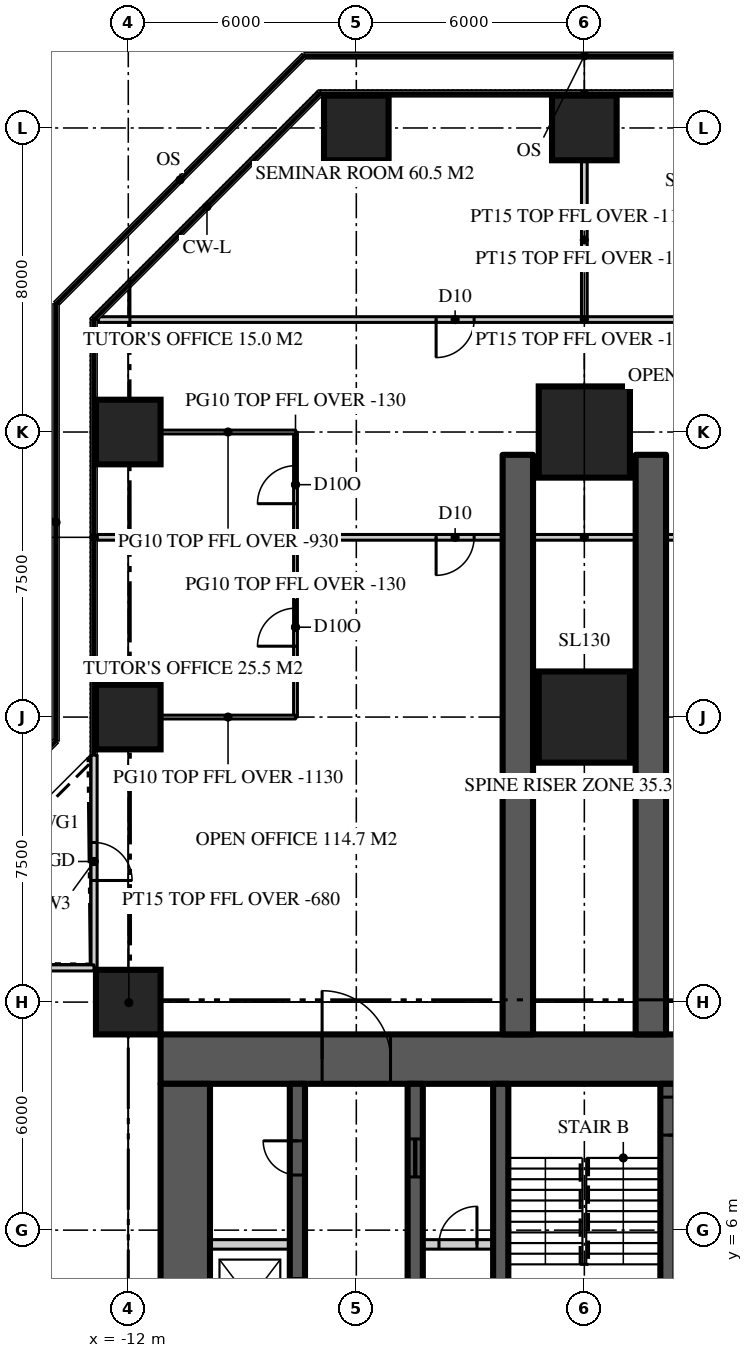
"""IFC4 building model, lengths in metres.
Left out: names, types, materials, properties, quantities, classifications, styles, units other than length and angle.
Written with IfcOpenShell. Run it as: python <this file> out.ifc"""

import sys

from ifc_helpers import new_model, si_unit, direction, frame, frame_2d, origin, origin_2d, place, context, subcontext, project, spatial, rectangle, extrude, element, fill, save


model = new_model("IFC4")
c1 = context("Model", 3, precision=1e-05, world=origin(), true_north=direction((0.0, 1.0)))
c2 = subcontext(c1, "Body", "Model", "MODEL_VIEW")
j1 = project(units=[si_unit("LENGTHUNIT", "METRE"), si_unit("PLANEANGLEUNIT", "RADIAN")], contexts=[c1])
p1 = place(None, origin())
s1 = spatial("IfcSite", under=j1, at=p1, CompositionType="ELEMENT")
p2 = place(p1, origin())
s2 = spatial("IfcBuilding", under=s1, at=p2, CompositionType="ELEMENT")
p3 = place(p2, frame((0.0, 0.0, 102.0)))
s3 = spatial("IfcBuildingStorey", under=s2, at=p3, CompositionType="ELEMENT", Elevation=102.0)
p4 = place(p3, frame((-11.15, 10.5, 0.0), z_axis=(0.0, 0.0, 1.0), x_axis=(1.0, 0.0, 0.0)))
e1 = element("IfcWall", 1, at=p4, inside=s3, PredefinedType="SHEAR", context=c2, shape_type="SweptSolid", body=[
    extrude(rectangle(XDim=22.3, YDim=1.3, at=frame_2d((11.15, 0.0))), origin(), (0.0, 0.0, 1.0), 3.9),
])
p5 = place(p4, frame((4.25, 0.0, 0.0)))
e2 = element("IfcOpeningElement", 2, at=p5, cuts=e1, PredefinedType="OPENING", context=c2, shape_type="SweptSolid", body=[
    extrude(rectangle(XDim=1.8, YDim=2.2, at=frame_2d((0.9, 1.1))), frame((0.0, 0.66, 0.0), z_axis=(0.0, -1.0, 0.0), x_axis=(1.0, 0.0, 0.0)), (0.0, 0.0, 1.0), 1.32),
])
p6 = place(p4, frame((16.25, 0.0, 0.0)))
e3 = element("IfcOpeningElement", 3, at=p6, cuts=e1, PredefinedType="OPENING", context=c2, shape_type="SweptSolid", body=[
    extrude(rectangle(XDim=1.8, YDim=2.2, at=frame_2d((0.9, 1.1))), frame((0.0, 0.66, 0.0), z_axis=(0.0, -1.0, 0.0), x_axis=(1.0, 0.0, 0.0)), (0.0, 0.0, 1.0), 1.32),
])
p7 = place(p3, frame((-10.5, 9.85, 0.0), z_axis=(0.0, 0.0, 1.0), x_axis=(0.0, -1.0, 0.0)))
e4 = element("IfcWall", 4, at=p7, inside=s3, PredefinedType="SHEAR", context=c2, shape_type="SweptSolid", body=[
    extrude(rectangle(XDim=19.7, YDim=1.3, at=frame_2d((9.85, 0.0))), origin(), (0.0, 0.0, 1.0), 3.9),
])
p8 = place(p7, frame((17.25, 0.0, 0.0)))
e5 = element("IfcOpeningElement", 5, at=p8, cuts=e4, PredefinedType="OPENING", context=c2, shape_type="SweptSolid", body=[
    extrude(rectangle(XDim=1.0, YDim=2.2, at=frame_2d((0.5, 1.1))), frame((0.0, 0.66, 0.0), z_axis=(0.0, -1.0, 0.0), x_axis=(1.0, 0.0, 0.0)), (0.0, 0.0, 1.0), 1.32),
])
for number, where, z_axis, x_axis in (
    (6, (1.75, 11.15, 0.0), (0.0, 0.0, 1.0), (0.0, 1.0, 0.0)),
    (7, (-1.75, 11.15, 0.0), (0.0, 0.0, 1.0), (0.0, 1.0, 0.0)),
):
    element("IfcWall", number, at=place(p3, frame(where, z_axis=z_axis, x_axis=x_axis)), inside=s3, PredefinedType="SHEAR", context=c2, shape_type="SweptSolid", body=[
        extrude(rectangle(XDim=15.25, YDim=0.8, at=frame_2d((7.625, 0.0))), origin(), (0.0, 0.0, 1.0), 3.9),
    ])
for number, where, z_axis, x_axis in (
    (8, (-12.0, 12.0, 0.0), (0.0, 0.0, 1.0), (1.0, 0.0, 0.0)),
    (9, (-12.0, 19.5, 0.0), (0.0, 0.0, 1.0), (1.0, 0.0, 0.0)),
):
    element("IfcColumn", number, at=place(p3, frame(where, z_axis=z_axis, x_axis=x_axis)), inside=s3, PredefinedType="COLUMN", context=c2, shape_type="SweptSolid", body=[
        extrude(rectangle(XDim=1.7, YDim=1.7, at=origin_2d()), origin(), (0.0, 0.0, 1.0), 3.9),
    ])
p9 = place(p3, frame((0.0, 19.5, 0.0), z_axis=(0.0, 0.0, 1.0), x_axis=(1.0, 0.0, 0.0)))
e10 = element("IfcColumn", 10, at=p9, inside=s3, PredefinedType="COLUMN", context=c2, shape_type="SweptSolid", body=[
    extrude(rectangle(XDim=2.4, YDim=2.4, at=origin_2d()), origin(), (0.0, 0.0, 1.0), 3.9),
])
p10 = place(p3, frame((-12.0, 27.0, 0.0), z_axis=(0.0, 0.0, 1.0), x_axis=(1.0, 0.0, 0.0)))
e11 = element("IfcColumn", 11, at=p10, inside=s3, PredefinedType="COLUMN", context=c2, shape_type="SweptSolid", body=[
    extrude(rectangle(XDim=1.7, YDim=1.7, at=origin_2d()), origin(), (0.0, 0.0, 1.0), 3.9),
])
p11 = place(p3, frame((0.0, 27.0, 0.0), z_axis=(0.0, 0.0, 1.0), x_axis=(1.0, 0.0, 0.0)))
e12 = element("IfcColumn", 12, at=p11, inside=s3, PredefinedType="COLUMN", context=c2, shape_type="SweptSolid", body=[
    extrude(rectangle(XDim=2.4, YDim=2.4, at=origin_2d()), origin(), (0.0, 0.0, 1.0), 3.9),
])
for number, where, z_axis, x_axis in (
    (13, (-6.0, 35.0, 0.0), (0.0, 0.0, 1.0), (1.0, 0.0, 0.0)),
    (14, (0.0, 35.0, 0.0), (0.0, 0.0, 1.0), (1.0, 0.0, 0.0)),
):
    element("IfcColumn", number, at=place(p3, frame(where, z_axis=z_axis, x_axis=x_axis)), inside=s3, PredefinedType="COLUMN", context=c2, shape_type="SweptSolid", body=[
        extrude(rectangle(XDim=1.7, YDim=1.7, at=origin_2d()), origin(), (0.0, 0.0, 1.0), 3.9),
    ])
p12 = place(p3, frame((-12.9, 18.5, 0.0), z_axis=(0.0, 0.0, 1.0), x_axis=(0.0, -1.0, 0.0)))
e15 = element("IfcWall", 15, at=p12, inside=s3, PredefinedType="SOLIDWALL", context=c2, shape_type="SweptSolid", body=[
    extrude(rectangle(XDim=5.6, YDim=0.16, at=frame_2d((2.8, 0.0))), origin(), (0.0, 0.0, 1.0), 3.77),
])
p13 = place(p12, frame((2.3, 0.0, 0.0)))
e16 = element("IfcOpeningElement", 16, at=p13, cuts=e15, PredefinedType="OPENING", context=c2, shape_type="SweptSolid", body=[
    extrude(rectangle(XDim=1.0, YDim=2.2, at=frame_2d((0.5, 1.1))), frame((0.0, 0.09, 0.0), z_axis=(0.0, -1.0, 0.0), x_axis=(1.0, 0.0, 0.0)), (0.0, 0.0, 1.0), 0.18),
])
p14 = place(p3, frame((-12.9, 12.9, 0.0), z_axis=(0.0, 0.0, 1.0), x_axis=(-1.0, 0.0, 0.0)))
e17 = element("IfcWall", 17, at=p14, inside=s3, PredefinedType="SOLIDWALL", context=c2, shape_type="SweptSolid", body=[
    extrude(rectangle(XDim=5.6, YDim=0.16, at=frame_2d((2.8, 0.0))), origin(), (0.0, 0.0, 1.0), 3.77),
])
p15 = place(p3, frame((-7.55, -9.85, 0.0), z_axis=(0.0, 0.0, 1.0), x_axis=(0.0, 1.0, 0.0)))
e18 = element("IfcWall", 18, at=p15, inside=s3, PredefinedType="SHEAR", context=c2, shape_type="SweptSolid", body=[
    extrude(rectangle(XDim=19.7, YDim=0.4, at=frame_2d((9.85, 0.0))), origin(), (0.0, 0.0, 1.0), 3.9),
])
p16 = place(p15, frame((1.45, 0.0, 0.0)))
e19 = element("IfcOpeningElement", 19, at=p16, cuts=e18, PredefinedType="OPENING", context=c2, shape_type="SweptSolid", body=[
    extrude(rectangle(XDim=1.0, YDim=2.2, at=frame_2d((0.5, 1.1))), frame((0.0, 0.21, 0.0), z_axis=(0.0, -1.0, 0.0), x_axis=(1.0, 0.0, 0.0)), (0.0, 0.0, 1.0), 0.42),
])
p17 = place(p15, frame((17.3, 0.0, 0.0)))
e20 = element("IfcOpeningElement", 20, at=p17, cuts=e18, PredefinedType="OPENING", context=c2, shape_type="SweptSolid", body=[
    extrude(rectangle(XDim=0.9, YDim=2.1, at=frame_2d((0.45, 1.05))), frame((0.0, 0.21, 0.0), z_axis=(0.0, -1.0, 0.0), x_axis=(1.0, 0.0, 0.0)), (0.0, 0.0, 1.0), 0.42),
])
p18 = place(p15, frame((5.125, 0.0, 0.0)))
e21 = element("IfcOpeningElement", 21, at=p18, cuts=e18, PredefinedType="OPENING", context=c2, shape_type="SweptSolid", body=[
    extrude(rectangle(XDim=1.1, YDim=2.2, at=frame_2d((0.55, 1.1))), frame((0.0, 0.21, 0.0), z_axis=(0.0, -1.0, 0.0), x_axis=(1.0, 0.0, 0.0)), (0.0, 0.0, 1.0), 0.42),
])
p19 = place(p15, frame((7.925, 0.0, 0.0)))
e22 = element("IfcOpeningElement", 22, at=p19, cuts=e18, PredefinedType="OPENING", context=c2, shape_type="SweptSolid", body=[
    extrude(rectangle(XDim=1.1, YDim=2.2, at=frame_2d((0.55, 1.1))), frame((0.0, 0.21, 0.0), z_axis=(0.0, -1.0, 0.0), x_axis=(1.0, 0.0, 0.0)), (0.0, 0.0, 1.0), 0.42),
])
p20 = place(p15, frame((10.675, 0.0, 0.0)))
e23 = element("IfcOpeningElement", 23, at=p20, cuts=e18, PredefinedType="OPENING", context=c2, shape_type="SweptSolid", body=[
    extrude(rectangle(XDim=1.1, YDim=2.2, at=frame_2d((0.55, 1.1))), frame((0.0, 0.21, 0.0), z_axis=(0.0, -1.0, 0.0), x_axis=(1.0, 0.0, 0.0)), (0.0, 0.0, 1.0), 0.42),
])
p21 = place(p15, frame((13.475, 0.0, 0.0)))
e24 = element("IfcOpeningElement", 24, at=p21, cuts=e18, PredefinedType="OPENING", context=c2, shape_type="SweptSolid", body=[
    extrude(rectangle(XDim=1.1, YDim=2.2, at=frame_2d((0.55, 1.1))), frame((0.0, 0.21, 0.0), z_axis=(0.0, -1.0, 0.0), x_axis=(1.0, 0.0, 0.0)), (0.0, 0.0, 1.0), 0.42),
])
p22 = place(p3, frame((-4.45, -9.85, 0.0), z_axis=(0.0, 0.0, 1.0), x_axis=(0.0, 1.0, 0.0)))
e25 = element("IfcWall", 25, at=p22, inside=s3, PredefinedType="SHEAR", context=c2, shape_type="SweptSolid", body=[
    extrude(rectangle(XDim=19.7, YDim=0.4, at=frame_2d((9.85, 0.0))), origin(), (0.0, 0.0, 1.0), 3.9),
])
p23 = place(p22, frame((1.95, 0.0, 0.0)))
e26 = element("IfcOpeningElement", 26, at=p23, cuts=e25, PredefinedType="OPENING", context=c2, shape_type="SweptSolid", body=[
    extrude(rectangle(XDim=1.0, YDim=2.2, at=frame_2d((0.5, 1.1))), frame((0.0, 0.21, 0.0), z_axis=(0.0, -1.0, 0.0), x_axis=(1.0, 0.0, 0.0)), (0.0, 0.0, 1.0), 0.42),
])
p24 = place(p22, frame((17.25, 0.0, 0.0)))
e27 = element("IfcOpeningElement", 27, at=p24, cuts=e25, PredefinedType="OPENING", context=c2, shape_type="SweptSolid", body=[
    extrude(rectangle(XDim=1.0, YDim=2.1, at=frame_2d((0.5, 1.05))), frame((0.0, 0.21, 0.0), z_axis=(0.0, -1.0, 0.0), x_axis=(1.0, 0.0, 0.0)), (0.0, 0.0, 1.0), 0.42),
])
p25 = place(p3, frame((-2.2, -9.85, 0.0), z_axis=(0.0, 0.0, 1.0), x_axis=(0.0, 1.0, 0.0)))
e28 = element("IfcWall", 28, at=p25, inside=s3, PredefinedType="SHEAR", context=c2, shape_type="SweptSolid", body=[
    extrude(rectangle(XDim=19.7, YDim=0.4, at=frame_2d((9.85, 0.0))), origin(), (0.0, 0.0, 1.0), 3.9),
])
p26 = place(p25, frame((0.35, 0.0, 0.0)))
e29 = element("IfcOpeningElement", 29, at=p26, cuts=e28, PredefinedType="OPENING", context=c2, shape_type="SweptSolid", body=[
    extrude(rectangle(XDim=1.0, YDim=2.2, at=frame_2d((0.5, 1.1))), frame((0.0, 0.21, 0.0), z_axis=(0.0, -1.0, 0.0), x_axis=(1.0, 0.0, 0.0)), (0.0, 0.0, 1.0), 0.42),
])
p27 = place(p3, frame((2.2, 9.85, 0.0), z_axis=(0.0, 0.0, 1.0), x_axis=(0.0, -1.0, 0.0)))
e30 = element("IfcWall", 30, at=p27, inside=s3, PredefinedType="SHEAR", context=c2, shape_type="SweptSolid", body=[
    extrude(rectangle(XDim=19.7, YDim=0.4, at=frame_2d((9.85, 0.0))), origin(), (0.0, 0.0, 1.0), 3.9),
])
p28 = place(p27, frame((0.35, 0.0, 0.0)))
e31 = element("IfcOpeningElement", 31, at=p28, cuts=e30, PredefinedType="OPENING", context=c2, shape_type="SweptSolid", body=[
    extrude(rectangle(XDim=1.0, YDim=2.2, at=frame_2d((0.5, 1.1))), frame((0.0, 0.21, 0.0), z_axis=(0.0, -1.0, 0.0), x_axis=(1.0, 0.0, 0.0)), (0.0, 0.0, 1.0), 0.42),
])
p29 = place(p3, frame((-9.85, 5.625, 0.0), z_axis=(0.0, 0.0, 1.0), x_axis=(1.0, 0.0, 0.0)))
e32 = element("IfcWall", 32, at=p29, inside=s3, PredefinedType="SOLIDWALL", context=c2, shape_type="SweptSolid", body=[
    extrude(rectangle(XDim=2.1, YDim=0.25, at=frame_2d((1.05, 0.0))), origin(), (0.0, 0.0, 1.0), 3.7),
])
p30 = place(p3, frame((-4.25, 5.625, 0.0), z_axis=(0.0, 0.0, 1.0), x_axis=(1.0, 0.0, 0.0)))
e33 = element("IfcWall", 33, at=p30, inside=s3, PredefinedType="SOLIDWALL", context=c2, shape_type="SweptSolid", body=[
    extrude(rectangle(XDim=1.85, YDim=0.25, at=frame_2d((0.925, 0.0))), origin(), (0.0, 0.0, 1.0), 3.7),
])
p31 = place(p30, frame((0.425, 0.0, 0.0)))
e34 = element("IfcOpeningElement", 34, at=p31, cuts=e33, PredefinedType="OPENING", context=c2, shape_type="SweptSolid", body=[
    extrude(rectangle(XDim=1.0, YDim=2.2, at=frame_2d((0.5, 1.1))), frame((0.0, 0.135, 0.0), z_axis=(0.0, -1.0, 0.0), x_axis=(1.0, 0.0, 0.0)), (0.0, 0.0, 1.0), 0.27),
])
p32 = place(p3, frame((12.82, 24.229, 0.0), z_axis=(0.0, 0.0, 1.0), x_axis=(-1.0, 0.0, 0.0)))
e35 = element("IfcWall", 35, at=p32, inside=s3, PredefinedType="PARTITIONING", context=c2, shape_type="SweptSolid", body=[
    extrude(rectangle(XDim=25.64, YDim=0.15, at=frame_2d((12.82, 0.0))), origin(), (0.0, 0.0, 1.0), 3.77),
])
p33 = place(p32, frame((15.72, 0.0, 0.0)))
e36 = element("IfcOpeningElement", 36, at=p33, cuts=e35, PredefinedType="OPENING", context=c2, shape_type="SweptSolid", body=[
    extrude(rectangle(XDim=1.0, YDim=2.2, at=frame_2d((0.5, 1.1))), frame((0.0, 0.085, 0.0), z_axis=(0.0, -1.0, 0.0), x_axis=(1.0, 0.0, 0.0)), (0.0, 0.0, 1.0), 0.17),
])
p34 = place(p32, frame((8.92, 0.0, 0.0)))
e37 = element("IfcOpeningElement", 37, at=p34, cuts=e35, PredefinedType="OPENING", context=c2, shape_type="SweptSolid", body=[
    extrude(rectangle(XDim=1.0, YDim=2.2, at=frame_2d((0.5, 1.1))), frame((0.0, 0.085, 0.0), z_axis=(0.0, -1.0, 0.0), x_axis=(1.0, 0.0, 0.0)), (0.0, 0.0, 1.0), 0.17),
])
p35 = place(p3, frame((12.786, 29.959, 0.0), z_axis=(0.0, 0.0, 1.0), x_axis=(-1.0, 0.0, 0.0)))
e38 = element("IfcWall", 38, at=p35, inside=s3, PredefinedType="PARTITIONING", context=c2, shape_type="SweptSolid", body=[
    extrude(rectangle(XDim=25.573, YDim=0.15, at=frame_2d((12.786, 0.0))), origin(), (0.0, 0.0, 1.0), 3.77),
])
p36 = place(p35, frame((15.687, 0.0, 0.0)))
e39 = element("IfcOpeningElement", 39, at=p36, cuts=e38, PredefinedType="OPENING", context=c2, shape_type="SweptSolid", body=[
    extrude(rectangle(XDim=1.0, YDim=2.2, at=frame_2d((0.5, 1.1))), frame((0.0, 0.085, 0.0), z_axis=(0.0, -1.0, 0.0), x_axis=(1.0, 0.0, 0.0)), (0.0, 0.0, 1.0), 0.17),
])
p37 = place(p35, frame((8.886, 0.0, 0.0)))
e40 = element("IfcOpeningElement", 40, at=p37, cuts=e38, PredefinedType="OPENING", context=c2, shape_type="SweptSolid", body=[
    extrude(rectangle(XDim=1.0, YDim=2.2, at=frame_2d((0.5, 1.1))), frame((0.0, 0.085, 0.0), z_axis=(0.0, -1.0, 0.0), x_axis=(1.0, 0.0, 0.0)), (0.0, 0.0, 1.0), 0.17),
])
p38 = place(p3, frame((0.0, 29.959, 0.0), z_axis=(0.0, 0.0, 1.0), x_axis=(0.0, 1.0, 0.0)))
e41 = element("IfcWall", 41, at=p38, inside=s3, PredefinedType="PARTITIONING", context=c2, shape_type="SweptSolid", body=[
    extrude(rectangle(XDim=4.191, YDim=0.15, at=frame_2d((2.095, 0.0))), origin(), (0.0, 0.0, 1.0), 2.77),
])
p39 = place(p3, frame((-7.6, 19.5, 0.0), z_axis=(0.0, 0.0, 1.0), x_axis=(0.0, 1.0, 0.0)))
e42 = element("IfcWall", 42, at=p39, inside=s3, PredefinedType="PARTITIONING", context=c2, shape_type="SweptSolid", body=[
    extrude(rectangle(XDim=4.729, YDim=0.1, at=frame_2d((2.365, 0.0))), origin(), (0.0, 0.0, 1.0), 3.77),
])
p40 = place(p39, frame((1.865, 0.0, 0.0)))
e43 = element("IfcOpeningElement", 43, at=p40, cuts=e42, PredefinedType="OPENING", context=c2, shape_type="SweptSolid", body=[
    extrude(rectangle(XDim=1.0, YDim=2.2, at=frame_2d((0.5, 1.1))), frame((0.0, 0.06, 0.0), z_axis=(0.0, -1.0, 0.0), x_axis=(1.0, 0.0, 0.0)), (0.0, 0.0, 1.0), 0.12),
])
p41 = place(p3, frame((-7.6, 24.229, 0.0), z_axis=(0.0, 0.0, 1.0), x_axis=(0.0, 1.0, 0.0)))
e44 = element("IfcWall", 44, at=p41, inside=s3, PredefinedType="PARTITIONING", context=c2, shape_type="SweptSolid", body=[
    extrude(rectangle(XDim=2.771, YDim=0.1, at=frame_2d((1.385, 0.0))), origin(), (0.0, 0.0, 1.0), 3.77),
])
p42 = place(p41, frame((0.885, 0.0, 0.0)))
e45 = element("IfcOpeningElement", 45, at=p42, cuts=e44, PredefinedType="OPENING", context=c2, shape_type="SweptSolid", body=[
    extrude(rectangle(XDim=1.0, YDim=2.2, at=frame_2d((0.5, 1.1))), frame((0.0, 0.06, 0.0), z_axis=(0.0, -1.0, 0.0), x_axis=(1.0, 0.0, 0.0)), (0.0, 0.0, 1.0), 0.12),
])
p43 = place(p3, frame((-7.6, 19.5, 0.0), z_axis=(0.0, 0.0, 1.0), x_axis=(-1.0, 0.0, 0.0)))
e46 = element("IfcWall", 46, at=p43, inside=s3, PredefinedType="PARTITIONING", context=c2, shape_type="SweptSolid", body=[
    extrude(rectangle(XDim=3.55, YDim=0.1, at=frame_2d((1.775, 0.0))), origin(), (0.0, 0.0, 1.0), 2.77),
])
p44 = place(p3, frame((-7.6, 27.0, 0.0), z_axis=(0.0, 0.0, 1.0), x_axis=(-1.0, 0.0, 0.0)))
e47 = element("IfcWall", 47, at=p44, inside=s3, PredefinedType="PARTITIONING", context=c2, shape_type="SweptSolid", body=[
    extrude(rectangle(XDim=3.55, YDim=0.1, at=frame_2d((1.775, 0.0))), origin(), (0.0, 0.0, 1.0), 2.97),
])
p45 = place(p3, frame((-11.15, 11.15, 0.0), z_axis=(0.0, 0.0, 1.0), x_axis=(-0.707106781187, 0.707106781187, 0.0)))
e48 = element("IfcWall", 48, at=p45, inside=s3, PredefinedType="PARTITIONING", context=c2, shape_type="SweptSolid", body=[
    extrude(rectangle(XDim=2.362, YDim=0.15, at=frame_2d((1.181, 0.0))), origin(), (0.0, 0.0, 1.0), 3.22),
])
p46 = place(p13, origin())
e49 = element("IfcDoor", 49, at=p46, inside=s3, OperationType="SINGLE_SWING_RIGHT", PredefinedType="DOOR", context=c2, shape_type="SweptSolid", body=[
    extrude(rectangle(XDim=1.0, YDim=2.2, at=frame_2d((0.5, 1.1))), frame((0.0, 0.025, 0.0), z_axis=(0.0, -1.0, 0.0), x_axis=(1.0, 0.0, 0.0)), (0.0, 0.0, 1.0), 0.05),
])
fill(e16, e49)
p47 = place(p5, origin())
e50 = element("IfcDoor", 50, at=p47, inside=s3, OperationType="DOUBLE_DOOR_DOUBLE_SWING", PredefinedType="DOOR", context=c2, shape_type="SweptSolid", body=[
    extrude(rectangle(XDim=1.8, YDim=2.2, at=frame_2d((0.9, 1.1))), frame((0.0, 0.025, 0.0), z_axis=(0.0, -1.0, 0.0), x_axis=(1.0, 0.0, 0.0)), (0.0, 0.0, 1.0), 0.05),
])
fill(e2, e50)
p48 = place(p28, origin())
e51 = element("IfcDoor", 51, at=p48, inside=s3, OperationType="SINGLE_SWING_RIGHT", PredefinedType="DOOR", context=c2, shape_type="SweptSolid", body=[
    extrude(rectangle(XDim=1.0, YDim=2.2, at=frame_2d((0.5, 1.1))), frame((0.0, 0.025, 0.0), z_axis=(0.0, -1.0, 0.0), x_axis=(1.0, 0.0, 0.0)), (0.0, 0.0, 1.0), 0.05),
])
fill(e31, e51)
p49 = place(p17, origin())
e52 = element("IfcDoor", 52, at=p49, inside=s3, OperationType="SINGLE_SWING_RIGHT", PredefinedType="DOOR", context=c2, shape_type="SweptSolid", body=[
    extrude(rectangle(XDim=0.9, YDim=2.1, at=frame_2d((0.45, 1.05))), frame((0.0, 0.025, 0.0), z_axis=(0.0, -1.0, 0.0), x_axis=(1.0, 0.0, 0.0)), (0.0, 0.0, 1.0), 0.05),
])
fill(e20, e52)
p50 = place(p24, origin())
e53 = element("IfcDoor", 53, at=p50, inside=s3, OperationType="SLIDING_TO_LEFT", PredefinedType="DOOR", context=c2, shape_type="SweptSolid", body=[
    extrude(rectangle(XDim=1.0, YDim=2.1, at=frame_2d((0.5, 1.05))), frame((0.0, 0.025, 0.0), z_axis=(0.0, -1.0, 0.0), x_axis=(1.0, 0.0, 0.0)), (0.0, 0.0, 1.0), 0.05),
])
fill(e27, e53)
p51 = place(p33, origin())
e54 = element("IfcDoor", 54, at=p51, inside=s3, OperationType="SINGLE_SWING_RIGHT", PredefinedType="DOOR", context=c2, shape_type="SweptSolid", body=[
    extrude(rectangle(XDim=1.0, YDim=2.2, at=frame_2d((0.5, 1.1))), frame((0.0, 0.025, 0.0), z_axis=(0.0, -1.0, 0.0), x_axis=(1.0, 0.0, 0.0)), (0.0, 0.0, 1.0), 0.05),
])
fill(e36, e54)
p52 = place(p36, origin())
e55 = element("IfcDoor", 55, at=p52, inside=s3, OperationType="SINGLE_SWING_RIGHT", PredefinedType="DOOR", context=c2, shape_type="SweptSolid", body=[
    extrude(rectangle(XDim=1.0, YDim=2.2, at=frame_2d((0.5, 1.1))), frame((0.0, 0.025, 0.0), z_axis=(0.0, -1.0, 0.0), x_axis=(1.0, 0.0, 0.0)), (0.0, 0.0, 1.0), 0.05),
])
fill(e39, e55)
p53 = place(p40, origin())
e56 = element("IfcDoor", 56, at=p53, inside=s3, OperationType="SINGLE_SWING_LEFT", PredefinedType="DOOR", context=c2, shape_type="SweptSolid", body=[
    extrude(rectangle(XDim=1.0, YDim=2.2, at=frame_2d((0.5, 1.1))), frame((0.0, 0.025, 0.0), z_axis=(0.0, -1.0, 0.0), x_axis=(1.0, 0.0, 0.0)), (0.0, 0.0, 1.0), 0.05),
])
fill(e43, e56)
p54 = place(p42, origin())
e57 = element("IfcDoor", 57, at=p54, inside=s3, OperationType="SINGLE_SWING_LEFT", PredefinedType="DOOR", context=c2, shape_type="SweptSolid", body=[
    extrude(rectangle(XDim=1.0, YDim=2.2, at=frame_2d((0.5, 1.1))), frame((0.0, 0.025, 0.0), z_axis=(0.0, -1.0, 0.0), x_axis=(1.0, 0.0, 0.0)), (0.0, 0.0, 1.0), 0.05),
])
fill(e45, e57)
p55 = place(p31, origin())
e58 = element("IfcDoor", 58, at=p55, inside=s3, OperationType="SINGLE_SWING_RIGHT", PredefinedType="DOOR", context=c2, shape_type="SweptSolid", body=[
    extrude(rectangle(XDim=1.0, YDim=2.2, at=frame_2d((0.5, 1.1))), frame((0.0, 0.025, 0.0), z_axis=(0.0, -1.0, 0.0), x_axis=(1.0, 0.0, 0.0)), (0.0, 0.0, 1.0), 0.05),
])
fill(e34, e58)
save(model, sys.argv[1])
